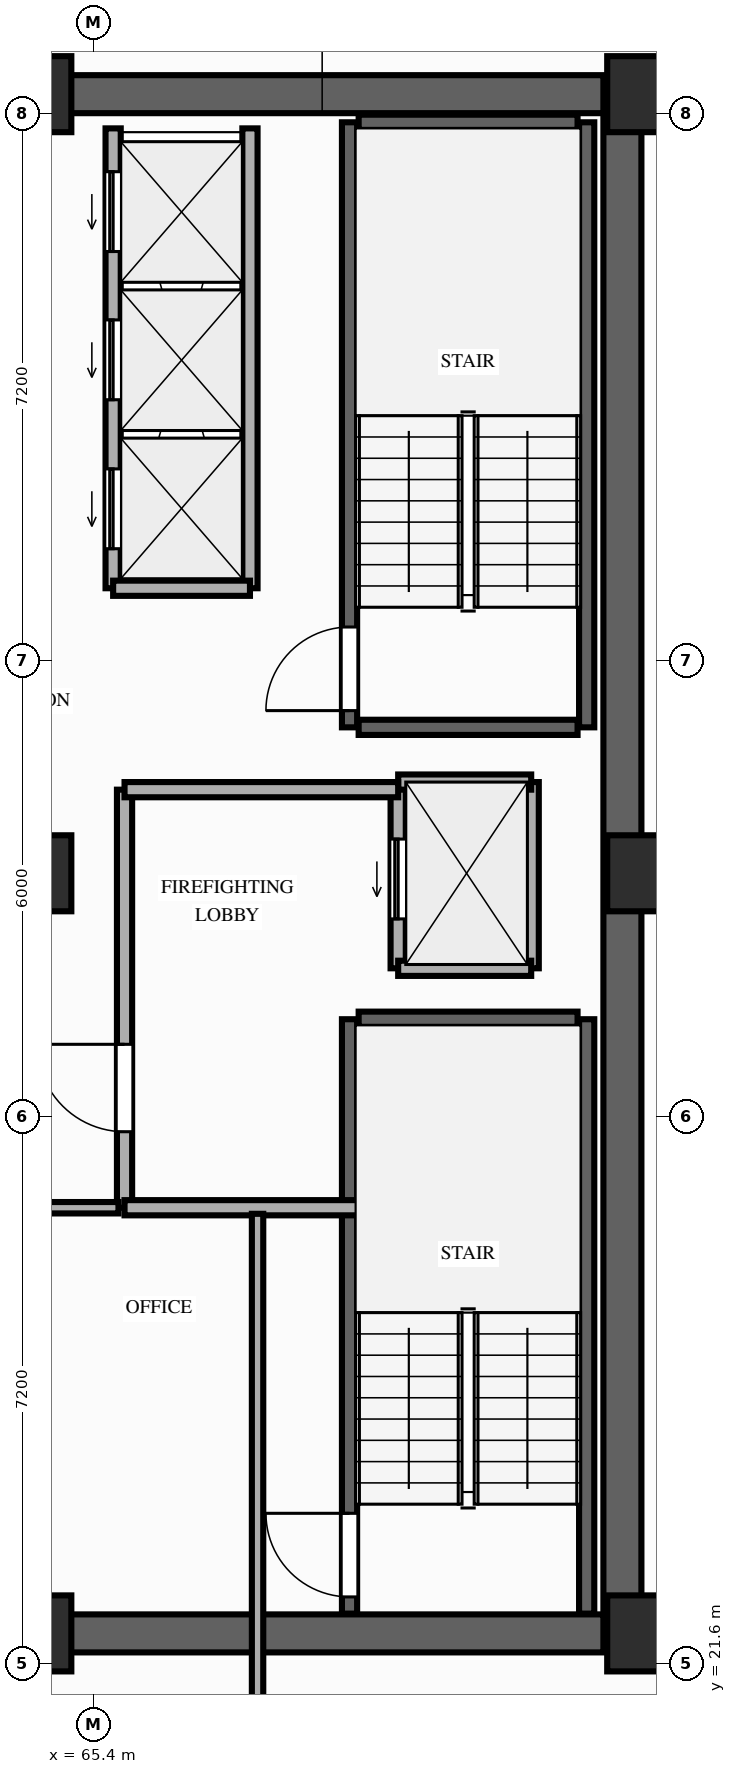
"""IFC4 building model, lengths in metres.
Left out: names, types, materials, properties, quantities, classifications, styles, units other than length and angle.
Written with IfcOpenShell. Run it as: python <this file> out.ifc"""

import sys

from ifc_helpers import new_model, si_unit, direction, frame, frame_2d, origin, origin_2d, place, context, subcontext, project, spatial, rectangle, extrude, element, fill, save


model = new_model("IFC4")
c1 = context("Model", 3, precision=1e-05, world=origin(), true_north=direction((0.0, 1.0)))
c2 = subcontext(c1, "Body", "Model", "MODEL_VIEW")
j1 = project(units=[si_unit("LENGTHUNIT", "METRE"), si_unit("PLANEANGLEUNIT", "RADIAN")], contexts=[c1])
p1 = place(None, origin())
s1 = spatial("IfcSite", under=j1, at=p1, CompositionType="ELEMENT")
p2 = place(p1, origin())
s2 = spatial("IfcBuilding", under=s1, at=p2, CompositionType="ELEMENT")
p3 = place(p2, frame((0.0, 0.0, 46.8)))
s3 = spatial("IfcBuildingStorey", under=s2, at=p3, CompositionType="ELEMENT", Elevation=46.8)
for number, where, z_axis, x_axis in (
    (1, (64.6, 22.0, 0.0), (0.0, 0.0, 1.0), (1.0, 0.0, 0.0)),
    (2, (72.65, 22.0, 0.0), (0.0, 0.0, 1.0), (1.0, 0.0, 0.0)),
    (3, (64.6, 32.0, 0.0), (0.0, 0.0, 1.0), (1.0, 0.0, 0.0)),
    (4, (72.65, 32.0, 0.0), (0.0, 0.0, 1.0), (1.0, 0.0, 0.0)),
    (5, (64.6, 42.25, 0.0), (0.0, 0.0, 1.0), (1.0, 0.0, 0.0)),
    (6, (72.65, 42.25, 0.0), (0.0, 0.0, 1.0), (1.0, 0.0, 0.0)),
):
    element("IfcColumn", number, at=place(p3, frame(where, z_axis=z_axis, x_axis=x_axis)), inside=s3, PredefinedType="COLUMN", context=c2, shape_type="SweptSolid", body=[
        extrude(rectangle(XDim=1.0, YDim=1.0, at=origin_2d()), origin(), (0.0, 0.0, 1.0), 3.2),
    ])
p4 = place(p3, frame((72.35, 22.0, 0.0), z_axis=(0.0, 0.0, 1.0), x_axis=(0.0, 1.0, 0.0)))
e7 = element("IfcWall", 7, at=p4, inside=s3, PredefinedType="SHEAR", context=c2, shape_type="SweptSolid", body=[
    extrude(rectangle(XDim=20.25, YDim=0.5, at=frame_2d((10.125, 0.0))), origin(), (0.0, 0.0, 1.0), 3.02),
])
for number, where, z_axis, x_axis in (
    (8, (64.6, 42.25, 0.0), (0.0, 0.0, 1.0), (1.0, 0.0, 0.0)),
    (9, (64.6, 22.0, 0.0), (0.0, 0.0, 1.0), (1.0, 0.0, 0.0)),
):
    element("IfcWall", number, at=place(p3, frame(where, z_axis=z_axis, x_axis=x_axis)), inside=s3, PredefinedType="SHEAR", context=c2, shape_type="SweptSolid", body=[
        extrude(rectangle(XDim=7.5, YDim=0.5, at=frame_2d((3.75, 0.0))), origin(), (0.0, 0.0, 1.0), 3.02),
    ])
p5 = place(p3, frame((68.76, 22.26, 0.0), z_axis=(0.0, 0.0, 1.0), x_axis=(0.0, 1.0, 0.0)))
e10 = element("IfcWall", 10, at=p5, inside=s3, PredefinedType="SHEAR", context=c2, shape_type="SweptSolid", body=[
    extrude(rectangle(XDim=7.82, YDim=0.2, at=frame_2d((3.91, 0.0))), origin(), (0.0, 0.0, 1.0), 3.02),
])
p6 = place(p5, frame((0.22, 0.0, 0.0)))
e11 = element("IfcOpeningElement", 11, at=p6, cuts=e10, PredefinedType="OPENING", context=c2, shape_type="SweptSolid", body=[
    extrude(rectangle(XDim=1.1, YDim=2.15, at=frame_2d((0.55, 1.075))), frame((0.0, 0.11, 0.0), z_axis=(0.0, -1.0, 0.0), x_axis=(1.0, 0.0, 0.0)), (0.0, 0.0, 1.0), 0.22),
])
p7 = place(p3, frame((71.88, 22.26, 0.0), z_axis=(0.0, 0.0, 1.0), x_axis=(0.0, 1.0, 0.0)))
e12 = element("IfcWall", 12, at=p7, inside=s3, PredefinedType="SHEAR", context=c2, shape_type="SweptSolid", body=[
    extrude(rectangle(XDim=7.82, YDim=0.2, at=frame_2d((3.91, 0.0))), origin(), (0.0, 0.0, 1.0), 3.02),
])
p8 = place(p3, frame((68.88, 30.08, 0.0), z_axis=(0.0, 0.0, 1.0), x_axis=(1.0, 0.0, 0.0)))
e13 = element("IfcWall", 13, at=p8, inside=s3, PredefinedType="SHEAR", context=c2, shape_type="SweptSolid", body=[
    extrude(rectangle(XDim=2.88, YDim=0.2, at=frame_2d((1.44, 0.0))), origin(), (0.0, 0.0, 1.0), 3.02),
])
p9 = place(p3, frame((68.76, 33.92, 0.0), z_axis=(0.0, 0.0, 1.0), x_axis=(0.0, 1.0, 0.0)))
e14 = element("IfcWall", 14, at=p9, inside=s3, PredefinedType="SHEAR", context=c2, shape_type="SweptSolid", body=[
    extrude(rectangle(XDim=7.96, YDim=0.2, at=frame_2d((3.98, 0.0))), origin(), (0.0, 0.0, 1.0), 3.02),
])
p10 = place(p9, frame((0.22, 0.0, 0.0)))
e15 = element("IfcOpeningElement", 15, at=p10, cuts=e14, PredefinedType="OPENING", context=c2, shape_type="SweptSolid", body=[
    extrude(rectangle(XDim=1.1, YDim=2.15, at=frame_2d((0.55, 1.075))), frame((0.0, 0.11, 0.0), z_axis=(0.0, -1.0, 0.0), x_axis=(1.0, 0.0, 0.0)), (0.0, 0.0, 1.0), 0.22),
])
p11 = place(p3, frame((71.88, 33.92, 0.0), z_axis=(0.0, 0.0, 1.0), x_axis=(0.0, 1.0, 0.0)))
e16 = element("IfcWall", 16, at=p11, inside=s3, PredefinedType="SHEAR", context=c2, shape_type="SweptSolid", body=[
    extrude(rectangle(XDim=7.96, YDim=0.2, at=frame_2d((3.98, 0.0))), origin(), (0.0, 0.0, 1.0), 3.02),
])
for number, where, z_axis, x_axis in (
    (17, (68.88, 41.88, 0.0), (0.0, 0.0, 1.0), (1.0, 0.0, 0.0)),
    (18, (68.88, 33.92, 0.0), (0.0, 0.0, 1.0), (1.0, 0.0, 0.0)),
):
    element("IfcWall", number, at=place(p3, frame(where, z_axis=z_axis, x_axis=x_axis)), inside=s3, PredefinedType="SHEAR", context=c2, shape_type="SweptSolid", body=[
        extrude(rectangle(XDim=2.88, YDim=0.2, at=frame_2d((1.44, 0.0))), origin(), (0.0, 0.0, 1.0), 3.02),
    ])
p12 = place(p3, frame((65.65, 35.75, 0.0), z_axis=(0.0, 0.0, 1.0), x_axis=(0.0, 1.0, 0.0)))
e19 = element("IfcWall", 19, at=p12, inside=s3, PredefinedType="MOVABLE", context=c2, shape_type="SweptSolid", body=[
    extrude(rectangle(XDim=6.05, YDim=0.2, at=frame_2d((3.025, 0.0))), origin(), (0.0, 0.0, 1.0), 3.02),
])
p13 = place(p12, frame((0.52, 0.0, 0.0)))
e20 = element("IfcOpeningElement", 20, at=p13, cuts=e19, PredefinedType="OPENING", context=c2, shape_type="SweptSolid", body=[
    extrude(rectangle(XDim=1.05, YDim=2.15, at=frame_2d((0.525, 1.075))), frame((0.0, 0.11, 0.0), z_axis=(0.0, -1.0, 0.0), x_axis=(1.0, 0.0, 0.0)), (0.0, 0.0, 1.0), 0.22),
])
p14 = place(p12, frame((2.48, 0.0, 0.0)))
e21 = element("IfcOpeningElement", 21, at=p14, cuts=e19, PredefinedType="OPENING", context=c2, shape_type="SweptSolid", body=[
    extrude(rectangle(XDim=1.05, YDim=2.15, at=frame_2d((0.525, 1.075))), frame((0.0, 0.11, 0.0), z_axis=(0.0, -1.0, 0.0), x_axis=(1.0, 0.0, 0.0)), (0.0, 0.0, 1.0), 0.22),
])
p15 = place(p12, frame((4.43, 0.0, 0.0)))
e22 = element("IfcOpeningElement", 22, at=p15, cuts=e19, PredefinedType="OPENING", context=c2, shape_type="SweptSolid", body=[
    extrude(rectangle(XDim=1.05, YDim=2.15, at=frame_2d((0.525, 1.075))), frame((0.0, 0.11, 0.0), z_axis=(0.0, -1.0, 0.0), x_axis=(1.0, 0.0, 0.0)), (0.0, 0.0, 1.0), 0.22),
])
p16 = place(p3, frame((67.45, 35.75, 0.0), z_axis=(0.0, 0.0, 1.0), x_axis=(0.0, 1.0, 0.0)))
e23 = element("IfcWall", 23, at=p16, inside=s3, PredefinedType="MOVABLE", context=c2, shape_type="SweptSolid", body=[
    extrude(rectangle(XDim=6.05, YDim=0.2, at=frame_2d((3.025, 0.0))), origin(), (0.0, 0.0, 1.0), 3.02),
])
p17 = place(p3, frame((65.65, 35.75, 0.0), z_axis=(0.0, 0.0, 1.0), x_axis=(1.0, 0.0, 0.0)))
e24 = element("IfcWall", 24, at=p17, inside=s3, PredefinedType="MOVABLE", context=c2, shape_type="SweptSolid", body=[
    extrude(rectangle(XDim=1.8, YDim=0.2, at=frame_2d((0.9, 0.0))), origin(), (0.0, 0.0, 1.0), 3.02),
])
p18 = place(p3, frame((69.4, 30.75, 0.0), z_axis=(0.0, 0.0, 1.0), x_axis=(0.0, 1.0, 0.0)))
e25 = element("IfcWall", 25, at=p18, inside=s3, PredefinedType="MOVABLE", context=c2, shape_type="SweptSolid", body=[
    extrude(rectangle(XDim=2.45, YDim=0.2, at=frame_2d((1.225, 0.0))), origin(), (0.0, 0.0, 1.0), 3.02),
])
p19 = place(p18, frame((0.65, 0.0, 0.0)))
e26 = element("IfcOpeningElement", 26, at=p19, cuts=e25, PredefinedType="OPENING", context=c2, shape_type="SweptSolid", body=[
    extrude(rectangle(XDim=1.05, YDim=2.15, at=frame_2d((0.525, 1.075))), frame((0.0, 0.11, 0.0), z_axis=(0.0, -1.0, 0.0), x_axis=(1.0, 0.0, 0.0)), (0.0, 0.0, 1.0), 0.22),
])
p20 = place(p3, frame((71.15, 30.75, 0.0), z_axis=(0.0, 0.0, 1.0), x_axis=(0.0, 1.0, 0.0)))
e27 = element("IfcWall", 27, at=p20, inside=s3, PredefinedType="MOVABLE", context=c2, shape_type="SweptSolid", body=[
    extrude(rectangle(XDim=2.45, YDim=0.2, at=frame_2d((1.225, 0.0))), origin(), (0.0, 0.0, 1.0), 3.02),
])
for number, where, z_axis, x_axis in (
    (28, (69.4, 33.2, 0.0), (0.0, 0.0, 1.0), (1.0, 0.0, 0.0)),
    (29, (69.4, 30.75, 0.0), (0.0, 0.0, 1.0), (1.0, 0.0, 0.0)),
):
    element("IfcWall", number, at=place(p3, frame(where, z_axis=z_axis, x_axis=x_axis)), inside=s3, PredefinedType="MOVABLE", context=c2, shape_type="SweptSolid", body=[
        extrude(rectangle(XDim=1.75, YDim=0.2, at=frame_2d((0.875, 0.0))), origin(), (0.0, 0.0, 1.0), 3.02),
    ])
p21 = place(p3, frame((65.8, 27.6, 0.0), z_axis=(0.0, 0.0, 1.0), x_axis=(0.0, 1.0, 0.0)))
e30 = element("IfcWall", 30, at=p21, inside=s3, PredefinedType="PARTITIONING", context=c2, shape_type="SweptSolid", body=[
    extrude(rectangle(XDim=5.5, YDim=0.2, at=frame_2d((2.75, 0.0))), origin(), (0.0, 0.0, 1.0), 3.02),
])
p22 = place(p21, frame((1.0, 0.0, 0.0)))
e31 = element("IfcOpeningElement", 31, at=p22, cuts=e30, PredefinedType="OPENING", context=c2, shape_type="SweptSolid", body=[
    extrude(rectangle(XDim=1.15, YDim=2.15, at=frame_2d((0.575, 1.075))), frame((0.0, 0.11, 0.0), z_axis=(0.0, -1.0, 0.0), x_axis=(1.0, 0.0, 0.0)), (0.0, 0.0, 1.0), 0.22),
])
p23 = place(p3, frame((65.8, 33.1, 0.0), z_axis=(0.0, 0.0, 1.0), x_axis=(1.0, 0.0, 0.0)))
e32 = element("IfcWall", 32, at=p23, inside=s3, PredefinedType="PARTITIONING", context=c2, shape_type="SweptSolid", body=[
    extrude(rectangle(XDim=3.6, YDim=0.2, at=frame_2d((1.8, 0.0))), origin(), (0.0, 0.0, 1.0), 3.02),
])
p24 = place(p3, frame((65.8, 27.6, 0.0), z_axis=(0.0, 0.0, 1.0), x_axis=(1.0, 0.0, 0.0)))
e33 = element("IfcWall", 33, at=p24, inside=s3, PredefinedType="PARTITIONING", context=c2, shape_type="SweptSolid", body=[
    extrude(rectangle(XDim=3.4, YDim=0.2, at=frame_2d((1.7, 0.0))), origin(), (0.0, 0.0, 1.0), 3.02),
])
p25 = place(p3, frame((67.55, 21.05, 0.0), z_axis=(0.0, 0.0, 1.0), x_axis=(0.0, 1.0, 0.0)))
e34 = element("IfcWall", 34, at=p25, inside=s3, PredefinedType="PARTITIONING", context=c2, shape_type="SweptSolid", body=[
    extrude(rectangle(XDim=6.47, YDim=0.15, at=frame_2d((3.235, 0.0))), origin(), (0.0, 0.0, 1.0), 2.5),
])
p26 = place(p3, frame((64.25, 27.6, 0.0), z_axis=(0.0, 0.0, 1.0), x_axis=(1.0, 0.0, 0.0)))
e35 = element("IfcWall", 35, at=p26, inside=s3, PredefinedType="PARTITIONING", context=c2, shape_type="SweptSolid", body=[
    extrude(rectangle(XDim=1.47, YDim=0.15, at=frame_2d((0.735, 0.0))), origin(), (0.0, 0.0, 1.0), 2.5),
])
p27 = place(p6, origin())
e36 = element("IfcDoor", 36, at=p27, inside=s3, OperationType="SINGLE_SWING_RIGHT", PredefinedType="DOOR", context=c2, shape_type="SweptSolid", body=[
    extrude(rectangle(XDim=1.1, YDim=2.15, at=frame_2d((0.55, 1.075))), frame((0.0, 0.025, 0.0), z_axis=(0.0, -1.0, 0.0), x_axis=(1.0, 0.0, 0.0)), (0.0, 0.0, 1.0), 0.05),
])
fill(e11, e36)
p28 = place(p10, origin())
e37 = element("IfcDoor", 37, at=p28, inside=s3, OperationType="SINGLE_SWING_LEFT", PredefinedType="DOOR", context=c2, shape_type="SweptSolid", body=[
    extrude(rectangle(XDim=1.1, YDim=2.15, at=frame_2d((0.55, 1.075))), frame((0.0, 0.025, 0.0), z_axis=(0.0, -1.0, 0.0), x_axis=(1.0, 0.0, 0.0)), (0.0, 0.0, 1.0), 0.05),
])
fill(e15, e37)
p29 = place(p13, origin())
e38 = element("IfcDoor", 38, at=p29, inside=s3, OperationType="SLIDING_TO_LEFT", PredefinedType="DOOR", context=c2, shape_type="SweptSolid", body=[
    extrude(rectangle(XDim=1.05, YDim=2.15, at=frame_2d((0.525, 1.075))), frame((0.0, 0.025, 0.0), z_axis=(0.0, -1.0, 0.0), x_axis=(1.0, 0.0, 0.0)), (0.0, 0.0, 1.0), 0.05),
])
fill(e20, e38)
p30 = place(p14, origin())
e39 = element("IfcDoor", 39, at=p30, inside=s3, OperationType="SLIDING_TO_LEFT", PredefinedType="DOOR", context=c2, shape_type="SweptSolid", body=[
    extrude(rectangle(XDim=1.05, YDim=2.15, at=frame_2d((0.525, 1.075))), frame((0.0, 0.025, 0.0), z_axis=(0.0, -1.0, 0.0), x_axis=(1.0, 0.0, 0.0)), (0.0, 0.0, 1.0), 0.05),
])
fill(e21, e39)
p31 = place(p15, origin())
e40 = element("IfcDoor", 40, at=p31, inside=s3, OperationType="SLIDING_TO_LEFT", PredefinedType="DOOR", context=c2, shape_type="SweptSolid", body=[
    extrude(rectangle(XDim=1.05, YDim=2.15, at=frame_2d((0.525, 1.075))), frame((0.0, 0.025, 0.0), z_axis=(0.0, -1.0, 0.0), x_axis=(1.0, 0.0, 0.0)), (0.0, 0.0, 1.0), 0.05),
])
fill(e22, e40)
p32 = place(p19, origin())
e41 = element("IfcDoor", 41, at=p32, inside=s3, OperationType="SLIDING_TO_LEFT", PredefinedType="DOOR", context=c2, shape_type="SweptSolid", body=[
    extrude(rectangle(XDim=1.05, YDim=2.15, at=frame_2d((0.525, 1.075))), frame((0.0, 0.025, 0.0), z_axis=(0.0, -1.0, 0.0), x_axis=(1.0, 0.0, 0.0)), (0.0, 0.0, 1.0), 0.05),
])
fill(e26, e41)
p33 = place(p22, origin())
e42 = element("IfcDoor", 42, at=p33, inside=s3, OperationType="SINGLE_SWING_RIGHT", PredefinedType="DOOR", context=c2, shape_type="SweptSolid", body=[
    extrude(rectangle(XDim=1.15, YDim=2.15, at=frame_2d((0.575, 1.075))), frame((0.0, 0.025, 0.0), z_axis=(0.0, -1.0, 0.0), x_axis=(1.0, 0.0, 0.0)), (0.0, 0.0, 1.0), 0.05),
])
fill(e31, e42)
save(model, sys.argv[1])
